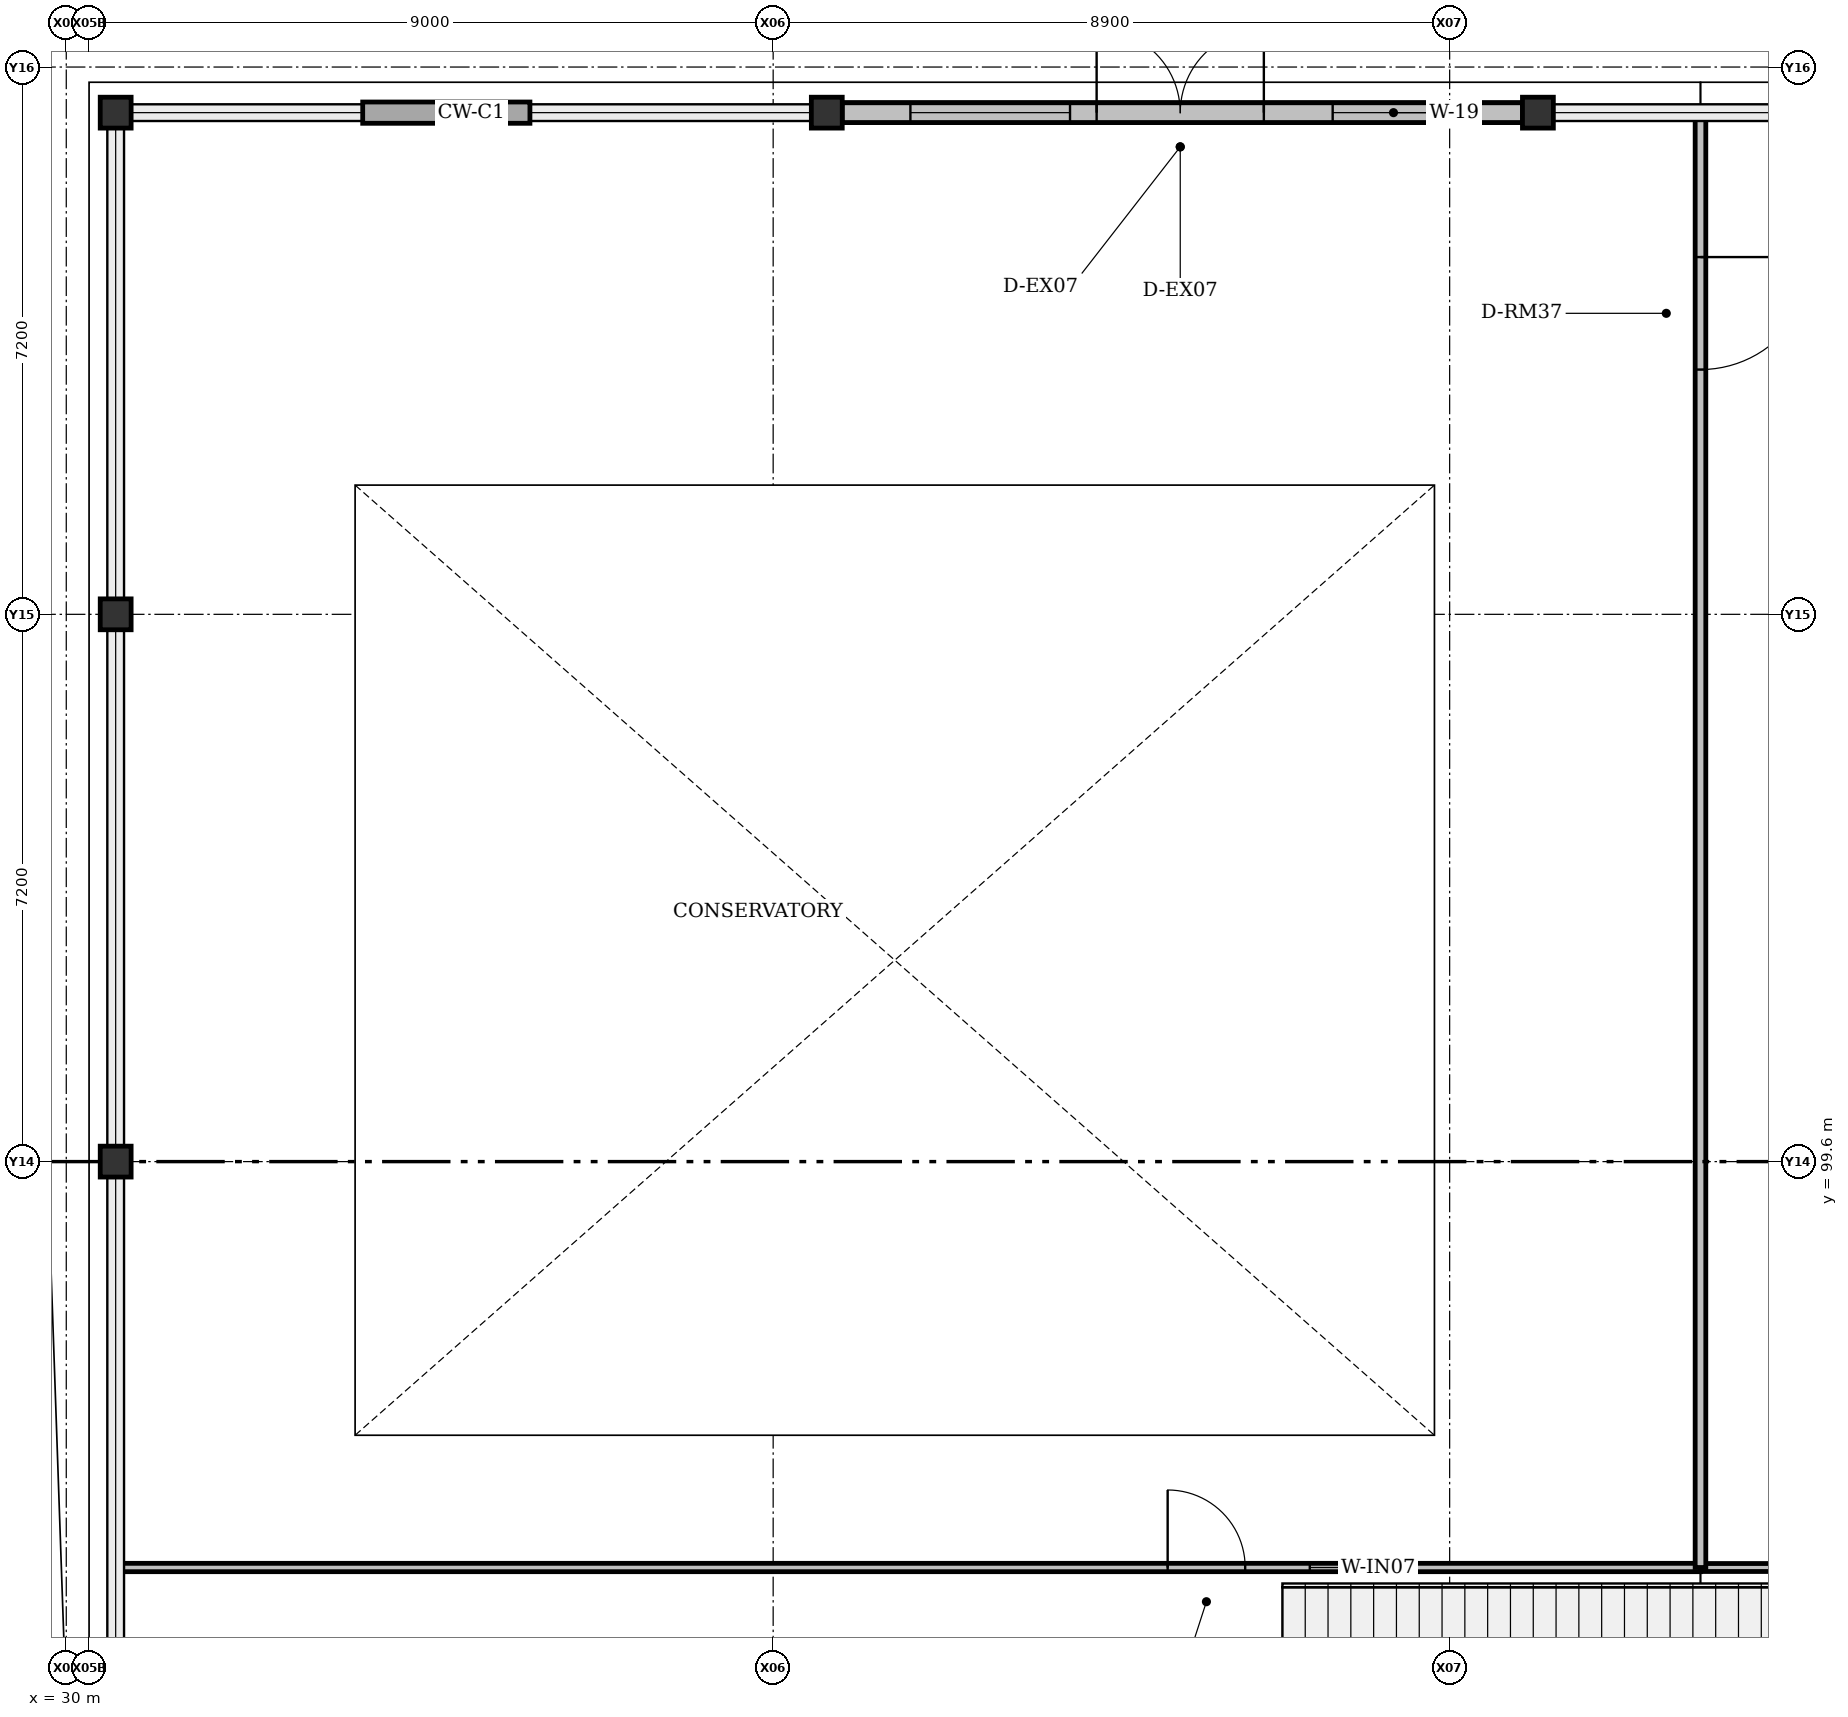
"""IFC4 building model, lengths in metres.
Left out: names, types, materials, properties, quantities, classifications, styles, units other than length and angle.
Written with IfcOpenShell. Run it as: python <this file> out.ifc"""

import sys

from ifc_helpers import new_model, si_unit, direction, frame, frame_2d, origin, origin_2d, place, context, subcontext, project, spatial, rectangle, hollow_circle, extrude, element, fill, save


model = new_model("IFC4")
c1 = context("Model", 3, precision=1e-05, world=origin(), true_north=direction((0.0, 1.0)))
c2 = subcontext(c1, "Body", "Model", "MODEL_VIEW")
j1 = project(units=[si_unit("LENGTHUNIT", "METRE"), si_unit("PLANEANGLEUNIT", "RADIAN")], contexts=[c1])
p1 = place(None, origin())
s1 = spatial("IfcSite", under=j1, at=p1, CompositionType="ELEMENT")
p2 = place(p1, origin())
s2 = spatial("IfcBuilding", under=s1, at=p2, CompositionType="ELEMENT")
p3 = place(p2, origin())
s3 = spatial("IfcBuildingStorey", under=s2, at=p3, CompositionType="ELEMENT", Elevation=0.0)
for number, where, z_axis, x_axis in (
    (1, (30.65, 113.4, 0.0), (0.0, 0.0, 1.0), (1.0, 0.0, 0.0)),
    (2, (40.006, 113.4, 0.0), (0.0, 0.0, 1.0), (1.0, 0.0, 0.0)),
    (3, (49.361, 113.4, 0.0), (0.0, 0.0, 1.0), (1.0, 0.0, 0.0)),
    (4, (30.65, 99.6, 0.0), (0.0, 0.0, 1.0), (1.0, 0.0, 0.0)),
    (5, (30.65, 106.8, 0.0), (0.0, 0.0, 1.0), (1.0, 0.0, 0.0)),
):
    element("IfcColumn", number, at=place(p3, frame(where, z_axis=z_axis, x_axis=x_axis)), inside=s3, PredefinedType="COLUMN", context=c2, shape_type="SweptSolid", body=[
        extrude(hollow_circle(Radius=0.203, WallThickness=0.016, at=origin_2d()), origin(), (0.0, 0.0, 1.0), 5.4),
    ])
p4 = place(p3, frame((40.207, 113.4, 0.0), z_axis=(0.0, 0.0, 1.0), x_axis=(1.0, 0.0, 0.0)))
e6 = element("IfcWall", 6, at=p4, inside=s3, PredefinedType="SOLIDWALL", context=c2, shape_type="SweptSolid", body=[
    extrude(rectangle(XDim=8.953, YDim=0.26, at=frame_2d((4.477, 0.0))), origin(), (0.0, 0.0, 1.0), 3.383),
])
p5 = place(p4, frame((3.349, 0.0, 0.0)))
e7 = element("IfcOpeningElement", 7, at=p5, cuts=e6, PredefinedType="OPENING", context=c2, shape_type="SweptSolid", body=[
    extrude(rectangle(XDim=2.2, YDim=2.4, at=frame_2d((1.1, 1.2))), frame((0.0, 0.13, 0.0), z_axis=(0.0, -1.0, 0.0), x_axis=(1.0, 0.0, 0.0)), (0.0, 0.0, 1.0), 0.26),
])
p6 = place(p3, frame((49.16, 113.4, 3.602), z_axis=(0.0, 0.0, 1.0), x_axis=(-1.0, 0.0, 0.0)))
e8 = element("IfcWall", 8, at=p6, inside=s3, PredefinedType="SOLIDWALL", context=c2, shape_type="SweptSolid", body=[
    extrude(rectangle(XDim=8.953, YDim=0.26, at=frame_2d((4.477, 0.0))), origin(), (0.0, 0.0, 1.0), 1.798),
])
p7 = place(p6, frame((0.899, 0.0, 0.22)))
e9 = element("IfcOpeningElement", 9, at=p7, cuts=e8, PredefinedType="OPENING", context=c2, shape_type="SweptSolid", body=[
    extrude(rectangle(XDim=1.6, YDim=1.35, at=frame_2d((0.8, 0.675))), frame((0.0, 0.13, 0.0), z_axis=(0.0, -1.0, 0.0), x_axis=(1.0, 0.0, 0.0)), (0.0, 0.0, 1.0), 0.26),
])
p8 = place(p6, frame((5.954, 0.0, 0.22)))
e10 = element("IfcOpeningElement", 10, at=p8, cuts=e8, PredefinedType="OPENING", context=c2, shape_type="SweptSolid", body=[
    extrude(rectangle(XDim=2.1, YDim=1.4, at=frame_2d((1.05, 0.7))), frame((0.0, 0.13, 0.0), z_axis=(0.0, -1.0, 0.0), x_axis=(1.0, 0.0, 0.0)), (0.0, 0.0, 1.0), 0.26),
])
p9 = place(p3, frame((30.65, 94.26, 0.0), z_axis=(0.0, 0.0, 1.0), x_axis=(1.0, 0.0, 0.0)))
e11 = element("IfcWall", 11, at=p9, inside=s3, PredefinedType="PARTITIONING", context=c2, shape_type="SweptSolid", body=[
    extrude(rectangle(XDim=20.85, YDim=0.11, at=frame_2d((10.425, 0.0))), origin(), (0.0, 0.0, 1.0), 5.15),
])
p10 = place(p9, frame((13.84, 0.0, 0.0)))
e12 = element("IfcOpeningElement", 12, at=p10, cuts=e11, PredefinedType="OPENING", context=c2, shape_type="SweptSolid", body=[
    extrude(rectangle(XDim=1.02, YDim=2.08, at=frame_2d((0.51, 1.04))), frame((0.0, 0.055, 0.0), z_axis=(0.0, -1.0, 0.0), x_axis=(1.0, 0.0, 0.0)), (0.0, 0.0, 1.0), 0.11),
])
p11 = place(p9, frame((15.71, 0.0, 0.92)))
e13 = element("IfcOpeningElement", 13, at=p11, cuts=e11, PredefinedType="OPENING", context=c2, shape_type="SweptSolid", body=[
    extrude(rectangle(XDim=1.2, YDim=1.2, at=frame_2d((0.6, 0.6))), frame((0.0, 0.055, 0.0), z_axis=(0.0, -1.0, 0.0), x_axis=(1.0, 0.0, 0.0)), (0.0, 0.0, 1.0), 0.11),
])
p12 = place(p3, frame((51.5, 94.26, 0.0), z_axis=(0.0, 0.0, 1.0), x_axis=(1.0, 0.0, 0.0)))
e14 = element("IfcWall", 14, at=p12, inside=s3, PredefinedType="PARTITIONING", context=c2, shape_type="SweptSolid", body=[
    extrude(rectangle(XDim=21.3, YDim=0.105, at=frame_2d((10.65, 0.0))), origin(), (0.0, 0.0, 1.0), 5.15),
])
p13 = place(p12, frame((11.33, 0.0, 0.0)))
e15 = element("IfcOpeningElement", 15, at=p13, cuts=e14, PredefinedType="OPENING", context=c2, shape_type="SweptSolid", body=[
    extrude(rectangle(XDim=1.14, YDim=2.18, at=frame_2d((0.57, 1.09))), frame((0.0, 0.052, 0.0), z_axis=(0.0, -1.0, 0.0), x_axis=(1.0, 0.0, 0.0)), (0.0, 0.0, 1.0), 0.105),
])
p14 = place(p12, frame((13.32, 0.0, 0.92)))
e16 = element("IfcOpeningElement", 16, at=p14, cuts=e14, PredefinedType="OPENING", context=c2, shape_type="SweptSolid", body=[
    extrude(rectangle(XDim=1.4, YDim=1.2, at=frame_2d((0.7, 0.6))), frame((0.0, 0.052, 0.0), z_axis=(0.0, -1.0, 0.0), x_axis=(1.0, 0.0, 0.0)), (0.0, 0.0, 1.0), 0.105),
])
p15 = place(p3, frame((51.5, 113.35, 0.0), z_axis=(0.0, 0.0, 1.0), x_axis=(0.0, -1.0, 0.0)))
e17 = element("IfcWall", 17, at=p15, inside=s3, PredefinedType="PARTITIONING", context=c2, shape_type="SweptSolid", body=[
    extrude(rectangle(XDim=19.09, YDim=0.14, at=frame_2d((9.545, 0.0))), origin(), (0.0, 0.0, 1.0), 5.15),
])
p16 = place(p15, frame((1.85, 0.0, 0.0)))
e18 = element("IfcOpeningElement", 18, at=p16, cuts=e17, PredefinedType="OPENING", context=c2, shape_type="SweptSolid", body=[
    extrude(rectangle(XDim=1.48, YDim=2.28, at=frame_2d((0.74, 1.14))), frame((0.0, 0.07, 0.0), z_axis=(0.0, -1.0, 0.0), x_axis=(1.0, 0.0, 0.0)), (0.0, 0.0, 1.0), 0.14),
])
p17 = place(p5, origin())
e19 = element("IfcDoor", 19, at=p17, inside=s3, OperationType="DOUBLE_DOOR_SINGLE_SWING", PredefinedType="DOOR", context=c2, shape_type="SweptSolid", body=[
    extrude(rectangle(XDim=2.2, YDim=2.4, at=frame_2d((1.1, 1.2))), frame((0.0, 0.025, 0.0), z_axis=(0.0, -1.0, 0.0), x_axis=(1.0, 0.0, 0.0)), (0.0, 0.0, 1.0), 0.05),
])
fill(e7, e19)
p18 = place(p7, origin())
e20 = element("IfcWindow", 20, at=p18, inside=s3, PartitioningType="DOUBLE_PANEL_VERTICAL", PredefinedType="WINDOW", context=c2, shape_type="SweptSolid", body=[
    extrude(rectangle(XDim=1.6, YDim=1.35, at=frame_2d((0.8, 0.675))), frame((0.0, 0.03, 0.0), z_axis=(0.0, -1.0, 0.0), x_axis=(1.0, 0.0, 0.0)), (0.0, 0.0, 1.0), 0.06),
])
fill(e9, e20)
p19 = place(p8, origin())
e21 = element("IfcWindow", 21, at=p19, inside=s3, PartitioningType="DOUBLE_PANEL_VERTICAL", PredefinedType="WINDOW", context=c2, shape_type="SweptSolid", body=[
    extrude(rectangle(XDim=2.1, YDim=1.4, at=frame_2d((1.05, 0.7))), frame((0.0, 0.03, 0.0), z_axis=(0.0, -1.0, 0.0), x_axis=(1.0, 0.0, 0.0)), (0.0, 0.0, 1.0), 0.06),
])
fill(e10, e21)
p20 = place(p10, origin())
e22 = element("IfcDoor", 22, at=p20, inside=s3, OperationType="SINGLE_SWING_LEFT", PredefinedType="DOOR", context=c2, shape_type="SweptSolid", body=[
    extrude(rectangle(XDim=1.02, YDim=2.08, at=frame_2d((0.51, 1.04))), frame((0.0, 0.025, 0.0), z_axis=(0.0, -1.0, 0.0), x_axis=(1.0, 0.0, 0.0)), (0.0, 0.0, 1.0), 0.05),
])
fill(e12, e22)
p21 = place(p11, origin())
e23 = element("IfcWindow", 23, at=p21, inside=s3, PartitioningType="SINGLE_PANEL", PredefinedType="WINDOW", context=c2, shape_type="SweptSolid", body=[
    extrude(rectangle(XDim=1.2, YDim=1.2, at=frame_2d((0.6, 0.6))), frame((0.0, 0.03, 0.0), z_axis=(0.0, -1.0, 0.0), x_axis=(1.0, 0.0, 0.0)), (0.0, 0.0, 1.0), 0.06),
])
fill(e13, e23)
p22 = place(p16, origin())
e24 = element("IfcDoor", 24, at=p22, inside=s3, OperationType="SINGLE_SWING_LEFT", PredefinedType="DOOR", context=c2, shape_type="SweptSolid", body=[
    extrude(rectangle(XDim=1.48, YDim=2.28, at=frame_2d((0.74, 1.14))), frame((0.0, 0.025, 0.0), z_axis=(0.0, -1.0, 0.0), x_axis=(1.0, 0.0, 0.0)), (0.0, 0.0, 1.0), 0.05),
])
fill(e18, e24)
save(model, sys.argv[1])
